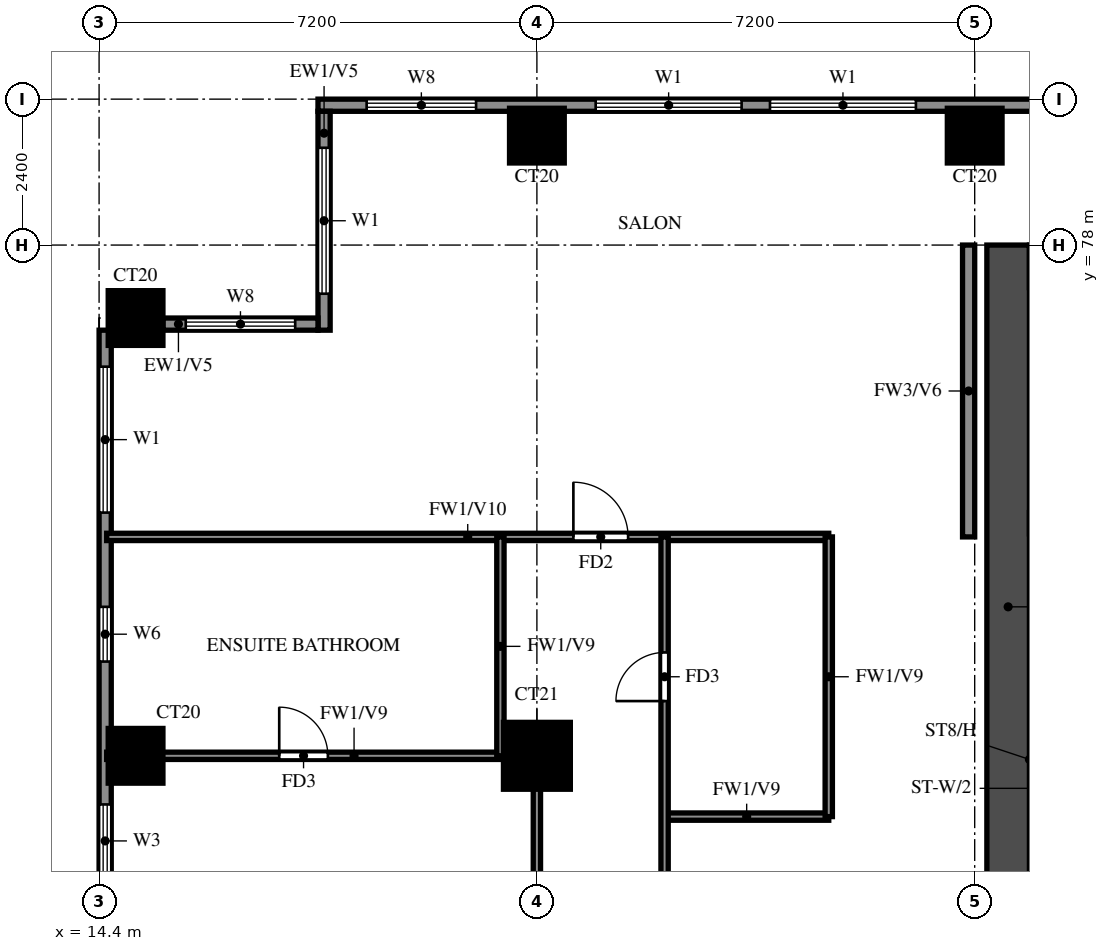
"""IFC4 building model, lengths in metres.
Left out: names, types, materials, properties, quantities, classifications, styles, units other than length and angle.
Written with IfcOpenShell. Run it as: python <this file> out.ifc"""

import sys

from ifc_helpers import new_model, si_unit, direction, frame, frame_2d, origin, origin_2d, place, context, subcontext, project, spatial, rectangle, extrude, source, transform, mapped, element, fill, save


model = new_model("IFC4")
c1 = context("Model", 3, precision=1e-05, world=origin(), true_north=direction((0.0, 1.0)))
c2 = subcontext(c1, "Body", "Model", "MODEL_VIEW")
j1 = project(units=[si_unit("LENGTHUNIT", "METRE"), si_unit("PLANEANGLEUNIT", "RADIAN")], contexts=[c1])
p1 = place(None, origin())
s1 = spatial("IfcSite", under=j1, at=p1, CompositionType="ELEMENT")
p2 = place(p1, origin())
s2 = spatial("IfcBuilding", under=s1, at=p2, CompositionType="ELEMENT")
p3 = place(p2, frame((0.0, 0.0, 134.0)))
s3 = spatial("IfcBuildingStorey", under=s2, at=p3, CompositionType="ELEMENT", Elevation=134.0)
m1 = source(origin(), c2, "Body", "SweptSolid", [
    extrude(rectangle(XDim=0.9, YDim=0.9, at=origin_2d()), origin(), (0.0, 0.0, 1.0), 3.15),
])
p4 = place(p3, frame((15.0, 69.6, 0.0), z_axis=(0.0, 0.0, 1.0), x_axis=(1.0, 0.0, 0.0)))
e1 = element("IfcColumn", 1, at=p4, inside=s3, PredefinedType="COLUMN", context=c2, shape_type="MappedRepresentation", body=[
    mapped(m1, transform((0.0, 0.0, 0.0))),
])
m2 = source(origin(), c2, "Body", "SweptSolid", [
    extrude(rectangle(XDim=1.1, YDim=1.1, at=origin_2d()), origin(), (0.0, 0.0, 1.0), 3.15),
])
p5 = place(p3, frame((21.6, 69.6, 0.0), z_axis=(0.0, 0.0, 1.0), x_axis=(1.0, 0.0, 0.0)))
e2 = element("IfcColumn", 2, at=p5, inside=s3, PredefinedType="COLUMN", context=c2, shape_type="MappedRepresentation", body=[
    mapped(m2, transform((0.0, 0.0, 0.0))),
])
for number, where, z_axis, x_axis in (
    (3, (15.0, 76.8, 0.0), (0.0, 0.0, 1.0), (1.0, 0.0, 0.0)),
    (4, (21.6, 79.8, 0.0), (0.0, 0.0, 1.0), (1.0, 0.0, 0.0)),
    (5, (28.8, 79.8, 0.0), (0.0, 0.0, 1.0), (1.0, 0.0, 0.0)),
):
    element("IfcColumn", number, at=place(p3, frame(where, z_axis=z_axis, x_axis=x_axis)), inside=s3, PredefinedType="COLUMN", context=c2, shape_type="MappedRepresentation", body=[
        mapped(m1, transform((0.0, 0.0, 0.0))),
    ])
p6 = place(p3, frame((29.35, 66.1, 0.0), z_axis=(0.0, 0.0, 1.0), x_axis=(0.0, 1.0, 0.0)))
e6 = element("IfcWall", 6, at=p6, inside=s3, PredefinedType="SHEAR", context=c2, shape_type="SweptSolid", body=[
    extrude(rectangle(XDim=11.9, YDim=0.7, at=frame_2d((5.95, 0.0))), origin(), (0.0, 0.0, 1.0), 3.15),
])
p7 = place(p3, frame((82.6, 80.3, 0.0), z_axis=(0.0, 0.0, 1.0), x_axis=(-1.0, 0.0, 0.0)))
e7 = element("IfcWall", 7, at=p7, inside=s3, PredefinedType="SOLIDWALL", context=c2, shape_type="SweptSolid", body=[
    extrude(rectangle(XDim=64.6, YDim=0.2, at=frame_2d((32.3, 0.0))), origin(), (0.0, 0.0, 1.0), 3.15),
])
p8 = place(p7, frame((4.3, 0.0, 0.0)))
e8 = element("IfcOpeningElement", 8, at=p8, cuts=e7, PredefinedType="OPENING", context=c2, shape_type="SweptSolid", body=[
    extrude(rectangle(XDim=1.8, YDim=2.4, at=frame_2d((0.9, 1.2))), frame((0.0, 0.11, 0.0), z_axis=(0.0, -1.0, 0.0), x_axis=(1.0, 0.0, 0.0)), (0.0, 0.0, 1.0), 0.22),
])
p9 = place(p7, frame((54.767, 0.0, 0.6)))
e9 = element("IfcOpeningElement", 9, at=p9, cuts=e7, PredefinedType="OPENING", context=c2, shape_type="SweptSolid", body=[
    extrude(rectangle(XDim=2.4, YDim=2.4, at=frame_2d((1.2, 1.2))), frame((0.0, 0.11, 0.0), z_axis=(0.0, -1.0, 0.0), x_axis=(1.0, 0.0, 0.0)), (0.0, 0.0, 1.0), 0.22),
])
p10 = place(p7, frame((57.633, 0.0, 0.6)))
e10 = element("IfcOpeningElement", 10, at=p10, cuts=e7, PredefinedType="OPENING", context=c2, shape_type="SweptSolid", body=[
    extrude(rectangle(XDim=2.4, YDim=2.4, at=frame_2d((1.2, 1.2))), frame((0.0, 0.11, 0.0), z_axis=(0.0, -1.0, 0.0), x_axis=(1.0, 0.0, 0.0)), (0.0, 0.0, 1.0), 0.22),
])
p11 = place(p7, frame((62.0, 0.0, 0.6)))
e11 = element("IfcOpeningElement", 11, at=p11, cuts=e7, PredefinedType="OPENING", context=c2, shape_type="SweptSolid", body=[
    extrude(rectangle(XDim=1.8, YDim=2.4, at=frame_2d((0.9, 1.2))), frame((0.0, 0.11, 0.0), z_axis=(0.0, -1.0, 0.0), x_axis=(1.0, 0.0, 0.0)), (0.0, 0.0, 1.0), 0.22),
])
p12 = place(p7, frame((1.7, 0.0, 0.6)))
e12 = element("IfcOpeningElement", 12, at=p12, cuts=e7, PredefinedType="OPENING", context=c2, shape_type="SweptSolid", body=[
    extrude(rectangle(XDim=1.2, YDim=2.4, at=frame_2d((0.6, 1.2))), frame((0.0, 0.11, 0.0), z_axis=(0.0, -1.0, 0.0), x_axis=(1.0, 0.0, 0.0)), (0.0, 0.0, 1.0), 0.22),
])
p13 = place(p7, frame((6.55, 0.0, 0.6)))
e13 = element("IfcOpeningElement", 13, at=p13, cuts=e7, PredefinedType="OPENING", context=c2, shape_type="SweptSolid", body=[
    extrude(rectangle(XDim=0.9, YDim=2.4, at=frame_2d((0.45, 1.2))), frame((0.0, 0.11, 0.0), z_axis=(0.0, -1.0, 0.0), x_axis=(1.0, 0.0, 0.0)), (0.0, 0.0, 1.0), 0.22),
])
p14 = place(p7, frame((8.3, 0.0, 0.6)))
e14 = element("IfcOpeningElement", 14, at=p14, cuts=e7, PredefinedType="OPENING", context=c2, shape_type="SweptSolid", body=[
    extrude(rectangle(XDim=1.8, YDim=2.4, at=frame_2d((0.9, 1.2))), frame((0.0, 0.11, 0.0), z_axis=(0.0, -1.0, 0.0), x_axis=(1.0, 0.0, 0.0)), (0.0, 0.0, 1.0), 0.22),
])
p15 = place(p3, frame((18.1, 80.2, 0.0), z_axis=(0.0, 0.0, 1.0), x_axis=(0.0, -1.0, 0.0)))
e15 = element("IfcWall", 15, at=p15, inside=s3, PredefinedType="SOLIDWALL", context=c2, shape_type="SweptSolid", body=[
    extrude(rectangle(XDim=3.6, YDim=0.2, at=frame_2d((1.8, 0.0))), origin(), (0.0, 0.0, 1.0), 3.15),
])
p16 = place(p15, frame((0.6, 0.0, 0.6)))
e16 = element("IfcOpeningElement", 16, at=p16, cuts=e15, PredefinedType="OPENING", context=c2, shape_type="SweptSolid", body=[
    extrude(rectangle(XDim=2.4, YDim=2.4, at=frame_2d((1.2, 1.2))), frame((0.0, 0.11, 0.0), z_axis=(0.0, -1.0, 0.0), x_axis=(1.0, 0.0, 0.0)), (0.0, 0.0, 1.0), 0.22),
])
p17 = place(p3, frame((18.0, 76.7, 0.0), z_axis=(0.0, 0.0, 1.0), x_axis=(-1.0, 0.0, 0.0)))
e17 = element("IfcWall", 17, at=p17, inside=s3, PredefinedType="SOLIDWALL", context=c2, shape_type="SweptSolid", body=[
    extrude(rectangle(XDim=2.55, YDim=0.2, at=frame_2d((1.275, 0.0))), origin(), (0.0, 0.0, 1.0), 3.15),
])
p18 = place(p17, frame((0.375, 0.0, 0.6)))
e18 = element("IfcOpeningElement", 18, at=p18, cuts=e17, PredefinedType="OPENING", context=c2, shape_type="SweptSolid", body=[
    extrude(rectangle(XDim=1.8, YDim=2.4, at=frame_2d((0.9, 1.2))), frame((0.0, 0.11, 0.0), z_axis=(0.0, -1.0, 0.0), x_axis=(1.0, 0.0, 0.0)), (0.0, 0.0, 1.0), 0.22),
])
p19 = place(p3, frame((14.5, 76.6, 0.0), z_axis=(0.0, 0.0, 1.0), x_axis=(0.0, -1.0, 0.0)))
e19 = element("IfcWall", 19, at=p19, inside=s3, PredefinedType="SOLIDWALL", context=c2, shape_type="SweptSolid", body=[
    extrude(rectangle(XDim=33.4, YDim=0.2, at=frame_2d((16.7, 0.0))), origin(), (0.0, 0.0, 1.0), 3.15),
])
p20 = place(p19, frame((11.5, 0.0, 0.0)))
e20 = element("IfcOpeningElement", 20, at=p20, cuts=e19, PredefinedType="OPENING", context=c2, shape_type="SweptSolid", body=[
    extrude(rectangle(XDim=1.8, YDim=2.4, at=frame_2d((0.9, 1.2))), frame((0.0, 0.11, 0.0), z_axis=(0.0, -1.0, 0.0), x_axis=(1.0, 0.0, 0.0)), (0.0, 0.0, 1.0), 0.22),
])
p21 = place(p19, frame((25.9, 0.0, 0.0)))
e21 = element("IfcOpeningElement", 21, at=p21, cuts=e19, PredefinedType="OPENING", context=c2, shape_type="SweptSolid", body=[
    extrude(rectangle(XDim=1.8, YDim=2.4, at=frame_2d((0.9, 1.2))), frame((0.0, 0.11, 0.0), z_axis=(0.0, -1.0, 0.0), x_axis=(1.0, 0.0, 0.0)), (0.0, 0.0, 1.0), 0.22),
])
p22 = place(p19, frame((29.25, 0.0, 0.6)))
e22 = element("IfcOpeningElement", 22, at=p22, cuts=e19, PredefinedType="OPENING", context=c2, shape_type="SweptSolid", body=[
    extrude(rectangle(XDim=0.9, YDim=2.4, at=frame_2d((0.45, 1.2))), frame((0.0, 0.11, 0.0), z_axis=(0.0, -1.0, 0.0), x_axis=(1.0, 0.0, 0.0)), (0.0, 0.0, 1.0), 0.22),
])
p23 = place(p19, frame((31.2, 0.0, 0.6)))
e23 = element("IfcOpeningElement", 23, at=p23, cuts=e19, PredefinedType="OPENING", context=c2, shape_type="SweptSolid", body=[
    extrude(rectangle(XDim=1.8, YDim=2.4, at=frame_2d((0.9, 1.2))), frame((0.0, 0.11, 0.0), z_axis=(0.0, -1.0, 0.0), x_axis=(1.0, 0.0, 0.0)), (0.0, 0.0, 1.0), 0.22),
])
p24 = place(p19, frame((18.2, 0.0, 0.6)))
e24 = element("IfcOpeningElement", 24, at=p24, cuts=e19, PredefinedType="OPENING", context=c2, shape_type="SweptSolid", body=[
    extrude(rectangle(XDim=2.4, YDim=2.4, at=frame_2d((1.2, 1.2))), frame((0.0, 0.11, 0.0), z_axis=(0.0, -1.0, 0.0), x_axis=(1.0, 0.0, 0.0)), (0.0, 0.0, 1.0), 0.22),
])
p25 = place(p19, frame((22.2, 0.0, 0.6)))
e25 = element("IfcOpeningElement", 25, at=p25, cuts=e19, PredefinedType="OPENING", context=c2, shape_type="SweptSolid", body=[
    extrude(rectangle(XDim=1.2, YDim=2.4, at=frame_2d((0.6, 1.2))), frame((0.0, 0.11, 0.0), z_axis=(0.0, -1.0, 0.0), x_axis=(1.0, 0.0, 0.0)), (0.0, 0.0, 1.0), 0.22),
])
p26 = place(p19, frame((14.85, 0.0, 0.6)))
e26 = element("IfcOpeningElement", 26, at=p26, cuts=e19, PredefinedType="OPENING", context=c2, shape_type="SweptSolid", body=[
    extrude(rectangle(XDim=0.9, YDim=2.4, at=frame_2d((0.45, 1.2))), frame((0.0, 0.11, 0.0), z_axis=(0.0, -1.0, 0.0), x_axis=(1.0, 0.0, 0.0)), (0.0, 0.0, 1.0), 0.22),
])
p27 = place(p19, frame((16.75, 0.0, 0.6)))
e27 = element("IfcOpeningElement", 27, at=p27, cuts=e19, PredefinedType="OPENING", context=c2, shape_type="SweptSolid", body=[
    extrude(rectangle(XDim=0.9, YDim=2.4, at=frame_2d((0.45, 1.2))), frame((0.0, 0.11, 0.0), z_axis=(0.0, -1.0, 0.0), x_axis=(1.0, 0.0, 0.0)), (0.0, 0.0, 1.0), 0.22),
])
p28 = place(p19, frame((7.8, 0.0, 0.6)))
e28 = element("IfcOpeningElement", 28, at=p28, cuts=e19, PredefinedType="OPENING", context=c2, shape_type="SweptSolid", body=[
    extrude(rectangle(XDim=1.2, YDim=2.4, at=frame_2d((0.6, 1.2))), frame((0.0, 0.11, 0.0), z_axis=(0.0, -1.0, 0.0), x_axis=(1.0, 0.0, 0.0)), (0.0, 0.0, 1.0), 0.22),
])
p29 = place(p19, frame((10.15, 0.0, 0.6)))
e29 = element("IfcOpeningElement", 29, at=p29, cuts=e19, PredefinedType="OPENING", context=c2, shape_type="SweptSolid", body=[
    extrude(rectangle(XDim=0.9, YDim=2.4, at=frame_2d((0.45, 1.2))), frame((0.0, 0.11, 0.0), z_axis=(0.0, -1.0, 0.0), x_axis=(1.0, 0.0, 0.0)), (0.0, 0.0, 1.0), 0.22),
])
p30 = place(p19, frame((4.55, 0.0, 1.5)))
e30 = element("IfcOpeningElement", 30, at=p30, cuts=e19, PredefinedType="OPENING", context=c2, shape_type="SweptSolid", body=[
    extrude(rectangle(XDim=0.9, YDim=0.9, at=frame_2d((0.45, 0.45))), frame((0.0, 0.11, 0.0), z_axis=(0.0, -1.0, 0.0), x_axis=(1.0, 0.0, 0.0)), (0.0, 0.0, 1.0), 0.22),
])
p31 = place(p19, frame((0.6, 0.0, 0.6)))
e31 = element("IfcOpeningElement", 31, at=p31, cuts=e19, PredefinedType="OPENING", context=c2, shape_type="SweptSolid", body=[
    extrude(rectangle(XDim=2.4, YDim=2.4, at=frame_2d((1.2, 1.2))), frame((0.0, 0.11, 0.0), z_axis=(0.0, -1.0, 0.0), x_axis=(1.0, 0.0, 0.0)), (0.0, 0.0, 1.0), 0.22),
])
p32 = place(p3, frame((28.7, 73.2, 0.0), z_axis=(0.0, 0.0, 1.0), x_axis=(0.0, 1.0, 0.0)))
e32 = element("IfcWall", 32, at=p32, inside=s3, PredefinedType="SOLIDWALL", context=c2, shape_type="SweptSolid", body=[
    extrude(rectangle(XDim=4.8, YDim=0.2, at=frame_2d((2.4, 0.0))), origin(), (0.0, 0.0, 1.0), 3.15),
])
p33 = place(p3, frame((23.7, 68.6, 0.0), z_axis=(0.0, 0.0, 1.0), x_axis=(1.0, 0.0, 0.0)))
e33 = element("IfcWall", 33, at=p33, inside=s3, PredefinedType="PARTITIONING", context=c2, shape_type="SweptSolid", body=[
    extrude(rectangle(XDim=2.7, YDim=0.12, at=frame_2d((1.35, 0.0))), origin(), (0.0, 0.0, 1.0), 3.15),
])
p34 = place(p3, frame((14.525, 69.6, 0.0), z_axis=(0.0, 0.0, 1.0), x_axis=(1.0, 0.0, 0.0)))
e34 = element("IfcWall", 34, at=p34, inside=s3, PredefinedType="PARTITIONING", context=c2, shape_type="SweptSolid", body=[
    extrude(rectangle(XDim=7.075, YDim=0.12, at=frame_2d((3.538, 0.0))), origin(), (0.0, 0.0, 1.0), 3.15),
])
p35 = place(p34, frame((2.837, 0.0, 0.0)))
e35 = element("IfcOpeningElement", 35, at=p35, cuts=e34, PredefinedType="OPENING", context=c2, shape_type="SweptSolid", body=[
    extrude(rectangle(XDim=0.8, YDim=2.1, at=frame_2d((0.4, 1.05))), frame((0.0, 0.07, 0.0), z_axis=(0.0, -1.0, 0.0), x_axis=(1.0, 0.0, 0.0)), (0.0, 0.0, 1.0), 0.14),
])
p36 = place(p3, frame((14.525, 73.2, 0.0), z_axis=(0.0, 0.0, 1.0), x_axis=(1.0, 0.0, 0.0)))
e36 = element("IfcWall", 36, at=p36, inside=s3, PredefinedType="PARTITIONING", context=c2, shape_type="SweptSolid", body=[
    extrude(rectangle(XDim=11.875, YDim=0.12, at=frame_2d((5.938, 0.0))), origin(), (0.0, 0.0, 1.0), 2.25),
])
p37 = place(p36, frame((7.675, 0.0, 0.0)))
e37 = element("IfcOpeningElement", 37, at=p37, cuts=e36, PredefinedType="OPENING", context=c2, shape_type="SweptSolid", body=[
    extrude(rectangle(XDim=0.9, YDim=2.1, at=frame_2d((0.45, 1.05))), frame((0.0, 0.07, 0.0), z_axis=(0.0, -1.0, 0.0), x_axis=(1.0, 0.0, 0.0)), (0.0, 0.0, 1.0), 0.14),
])
p38 = place(p3, frame((21.0, 69.6, 0.0), z_axis=(0.0, 0.0, 1.0), x_axis=(0.0, 1.0, 0.0)))
e38 = element("IfcWall", 38, at=p38, inside=s3, PredefinedType="PARTITIONING", context=c2, shape_type="SweptSolid", body=[
    extrude(rectangle(XDim=3.6, YDim=0.12, at=frame_2d((1.8, 0.0))), origin(), (0.0, 0.0, 1.0), 3.15),
])
p39 = place(p3, frame((21.6, 48.0, 0.0), z_axis=(0.0, 0.0, 1.0), x_axis=(0.0, 1.0, 0.0)))
e39 = element("IfcWall", 39, at=p39, inside=s3, PredefinedType="PARTITIONING", context=c2, shape_type="SweptSolid", body=[
    extrude(rectangle(XDim=21.6, YDim=0.12, at=frame_2d((10.8, 0.0))), origin(), (0.0, 0.0, 1.0), 3.15),
])
p40 = place(p39, frame((1.35, 0.0, 0.0)))
e40 = element("IfcOpeningElement", 40, at=p40, cuts=e39, PredefinedType="OPENING", context=c2, shape_type="SweptSolid", body=[
    extrude(rectangle(XDim=0.9, YDim=2.1, at=frame_2d((0.45, 1.05))), frame((0.0, 0.07, 0.0), z_axis=(0.0, -1.0, 0.0), x_axis=(1.0, 0.0, 0.0)), (0.0, 0.0, 1.0), 0.14),
])
p41 = place(p39, frame((7.95, 0.0, 0.0)))
e41 = element("IfcOpeningElement", 41, at=p41, cuts=e39, PredefinedType="OPENING", context=c2, shape_type="SweptSolid", body=[
    extrude(rectangle(XDim=1.5, YDim=2.1, at=frame_2d((0.75, 1.05))), frame((0.0, 0.07, 0.0), z_axis=(0.0, -1.0, 0.0), x_axis=(1.0, 0.0, 0.0)), (0.0, 0.0, 1.0), 0.14),
])
p42 = place(p39, frame((12.15, 0.0, 0.0)))
e42 = element("IfcOpeningElement", 42, at=p42, cuts=e39, PredefinedType="OPENING", context=c2, shape_type="SweptSolid", body=[
    extrude(rectangle(XDim=0.9, YDim=2.1, at=frame_2d((0.45, 1.05))), frame((0.0, 0.07, 0.0), z_axis=(0.0, -1.0, 0.0), x_axis=(1.0, 0.0, 0.0)), (0.0, 0.0, 1.0), 0.14),
])
p43 = place(p39, frame((17.55, 0.0, 0.0)))
e43 = element("IfcOpeningElement", 43, at=p43, cuts=e39, PredefinedType="OPENING", context=c2, shape_type="SweptSolid", body=[
    extrude(rectangle(XDim=0.9, YDim=2.1, at=frame_2d((0.45, 1.05))), frame((0.0, 0.07, 0.0), z_axis=(0.0, -1.0, 0.0), x_axis=(1.0, 0.0, 0.0)), (0.0, 0.0, 1.0), 0.14),
])
p44 = place(p3, frame((23.7, 61.2, 0.0), z_axis=(0.0, 0.0, 1.0), x_axis=(0.0, 1.0, 0.0)))
e44 = element("IfcWall", 44, at=p44, inside=s3, PredefinedType="PARTITIONING", context=c2, shape_type="SweptSolid", body=[
    extrude(rectangle(XDim=12.0, YDim=0.12, at=frame_2d((6.0, 0.0))), origin(), (0.0, 0.0, 1.0), 3.15),
])
p45 = place(p44, frame((4.55, 0.0, 0.0)))
e45 = element("IfcOpeningElement", 45, at=p45, cuts=e44, PredefinedType="OPENING", context=c2, shape_type="SweptSolid", body=[
    extrude(rectangle(XDim=0.9, YDim=2.1, at=frame_2d((0.45, 1.05))), frame((0.0, 0.07, 0.0), z_axis=(0.0, -1.0, 0.0), x_axis=(1.0, 0.0, 0.0)), (0.0, 0.0, 1.0), 0.14),
])
p46 = place(p44, frame((9.3, 0.0, 0.0)))
e46 = element("IfcOpeningElement", 46, at=p46, cuts=e44, PredefinedType="OPENING", context=c2, shape_type="SweptSolid", body=[
    extrude(rectangle(XDim=0.8, YDim=2.1, at=frame_2d((0.4, 1.05))), frame((0.0, 0.07, 0.0), z_axis=(0.0, -1.0, 0.0), x_axis=(1.0, 0.0, 0.0)), (0.0, 0.0, 1.0), 0.14),
])
p47 = place(p3, frame((26.4, 68.6, 0.0), z_axis=(0.0, 0.0, 1.0), x_axis=(0.0, 1.0, 0.0)))
e47 = element("IfcWall", 47, at=p47, inside=s3, PredefinedType="PARTITIONING", context=c2, shape_type="SweptSolid", body=[
    extrude(rectangle(XDim=4.6, YDim=0.12, at=frame_2d((2.3, 0.0))), origin(), (0.0, 0.0, 1.0), 3.15),
])
p48 = place(p9, origin())
e48 = element("IfcWindow", 48, at=p48, inside=s3, PartitioningType="DOUBLE_PANEL_VERTICAL", PredefinedType="WINDOW", context=c2, shape_type="SweptSolid", body=[
    extrude(rectangle(XDim=2.4, YDim=2.4, at=frame_2d((1.2, 1.2))), frame((0.0, 0.03, 0.0), z_axis=(0.0, -1.0, 0.0), x_axis=(1.0, 0.0, 0.0)), (0.0, 0.0, 1.0), 0.06),
])
fill(e9, e48)
p49 = place(p10, origin())
e49 = element("IfcWindow", 49, at=p49, inside=s3, PartitioningType="DOUBLE_PANEL_VERTICAL", PredefinedType="WINDOW", context=c2, shape_type="SweptSolid", body=[
    extrude(rectangle(XDim=2.4, YDim=2.4, at=frame_2d((1.2, 1.2))), frame((0.0, 0.03, 0.0), z_axis=(0.0, -1.0, 0.0), x_axis=(1.0, 0.0, 0.0)), (0.0, 0.0, 1.0), 0.06),
])
fill(e10, e49)
p50 = place(p11, origin())
e50 = element("IfcWindow", 50, at=p50, inside=s3, PartitioningType="DOUBLE_PANEL_VERTICAL", PredefinedType="WINDOW", context=c2, shape_type="SweptSolid", body=[
    extrude(rectangle(XDim=1.8, YDim=2.4, at=frame_2d((0.9, 1.2))), frame((0.0, 0.03, 0.0), z_axis=(0.0, -1.0, 0.0), x_axis=(1.0, 0.0, 0.0)), (0.0, 0.0, 1.0), 0.06),
])
fill(e11, e50)
p51 = place(p16, origin())
e51 = element("IfcWindow", 51, at=p51, inside=s3, PartitioningType="DOUBLE_PANEL_VERTICAL", PredefinedType="WINDOW", context=c2, shape_type="SweptSolid", body=[
    extrude(rectangle(XDim=2.4, YDim=2.4, at=frame_2d((1.2, 1.2))), frame((0.0, 0.03, 0.0), z_axis=(0.0, -1.0, 0.0), x_axis=(1.0, 0.0, 0.0)), (0.0, 0.0, 1.0), 0.06),
])
fill(e16, e51)
p52 = place(p18, origin())
e52 = element("IfcWindow", 52, at=p52, inside=s3, PartitioningType="DOUBLE_PANEL_VERTICAL", PredefinedType="WINDOW", context=c2, shape_type="SweptSolid", body=[
    extrude(rectangle(XDim=1.8, YDim=2.4, at=frame_2d((0.9, 1.2))), frame((0.0, 0.03, 0.0), z_axis=(0.0, -1.0, 0.0), x_axis=(1.0, 0.0, 0.0)), (0.0, 0.0, 1.0), 0.06),
])
fill(e18, e52)
p53 = place(p28, origin())
e53 = element("IfcWindow", 53, at=p53, inside=s3, PartitioningType="SINGLE_PANEL", PredefinedType="WINDOW", context=c2, shape_type="SweptSolid", body=[
    extrude(rectangle(XDim=1.2, YDim=2.4, at=frame_2d((0.6, 1.2))), frame((0.0, 0.03, 0.0), z_axis=(0.0, -1.0, 0.0), x_axis=(1.0, 0.0, 0.0)), (0.0, 0.0, 1.0), 0.06),
])
fill(e28, e53)
p54 = place(p30, origin())
e54 = element("IfcWindow", 54, at=p54, inside=s3, PartitioningType="SINGLE_PANEL", PredefinedType="WINDOW", context=c2, shape_type="SweptSolid", body=[
    extrude(rectangle(XDim=0.9, YDim=0.9, at=frame_2d((0.45, 0.45))), frame((0.0, 0.03, 0.0), z_axis=(0.0, -1.0, 0.0), x_axis=(1.0, 0.0, 0.0)), (0.0, 0.0, 1.0), 0.06),
])
fill(e30, e54)
p55 = place(p31, origin())
e55 = element("IfcWindow", 55, at=p55, inside=s3, PartitioningType="DOUBLE_PANEL_VERTICAL", PredefinedType="WINDOW", context=c2, shape_type="SweptSolid", body=[
    extrude(rectangle(XDim=2.4, YDim=2.4, at=frame_2d((1.2, 1.2))), frame((0.0, 0.03, 0.0), z_axis=(0.0, -1.0, 0.0), x_axis=(1.0, 0.0, 0.0)), (0.0, 0.0, 1.0), 0.06),
])
fill(e31, e55)
p56 = place(p35, origin())
e56 = element("IfcDoor", 56, at=p56, inside=s3, OperationType="SINGLE_SWING_LEFT", PredefinedType="DOOR", context=c2, shape_type="SweptSolid", body=[
    extrude(rectangle(XDim=0.8, YDim=2.1, at=frame_2d((0.4, 1.05))), frame((0.0, 0.025, 0.0), z_axis=(0.0, -1.0, 0.0), x_axis=(1.0, 0.0, 0.0)), (0.0, 0.0, 1.0), 0.05),
])
fill(e35, e56)
p57 = place(p37, origin())
e57 = element("IfcDoor", 57, at=p57, inside=s3, OperationType="SINGLE_SWING_LEFT", PredefinedType="DOOR", context=c2, shape_type="SweptSolid", body=[
    extrude(rectangle(XDim=0.9, YDim=2.1, at=frame_2d((0.45, 1.05))), frame((0.0, 0.025, 0.0), z_axis=(0.0, -1.0, 0.0), x_axis=(1.0, 0.0, 0.0)), (0.0, 0.0, 1.0), 0.05),
])
fill(e37, e57)
p58 = place(p46, origin())
e58 = element("IfcDoor", 58, at=p58, inside=s3, OperationType="SINGLE_SWING_LEFT", PredefinedType="DOOR", context=c2, shape_type="SweptSolid", body=[
    extrude(rectangle(XDim=0.8, YDim=2.1, at=frame_2d((0.4, 1.05))), frame((0.0, 0.025, 0.0), z_axis=(0.0, -1.0, 0.0), x_axis=(1.0, 0.0, 0.0)), (0.0, 0.0, 1.0), 0.05),
])
fill(e46, e58)
save(model, sys.argv[1])
